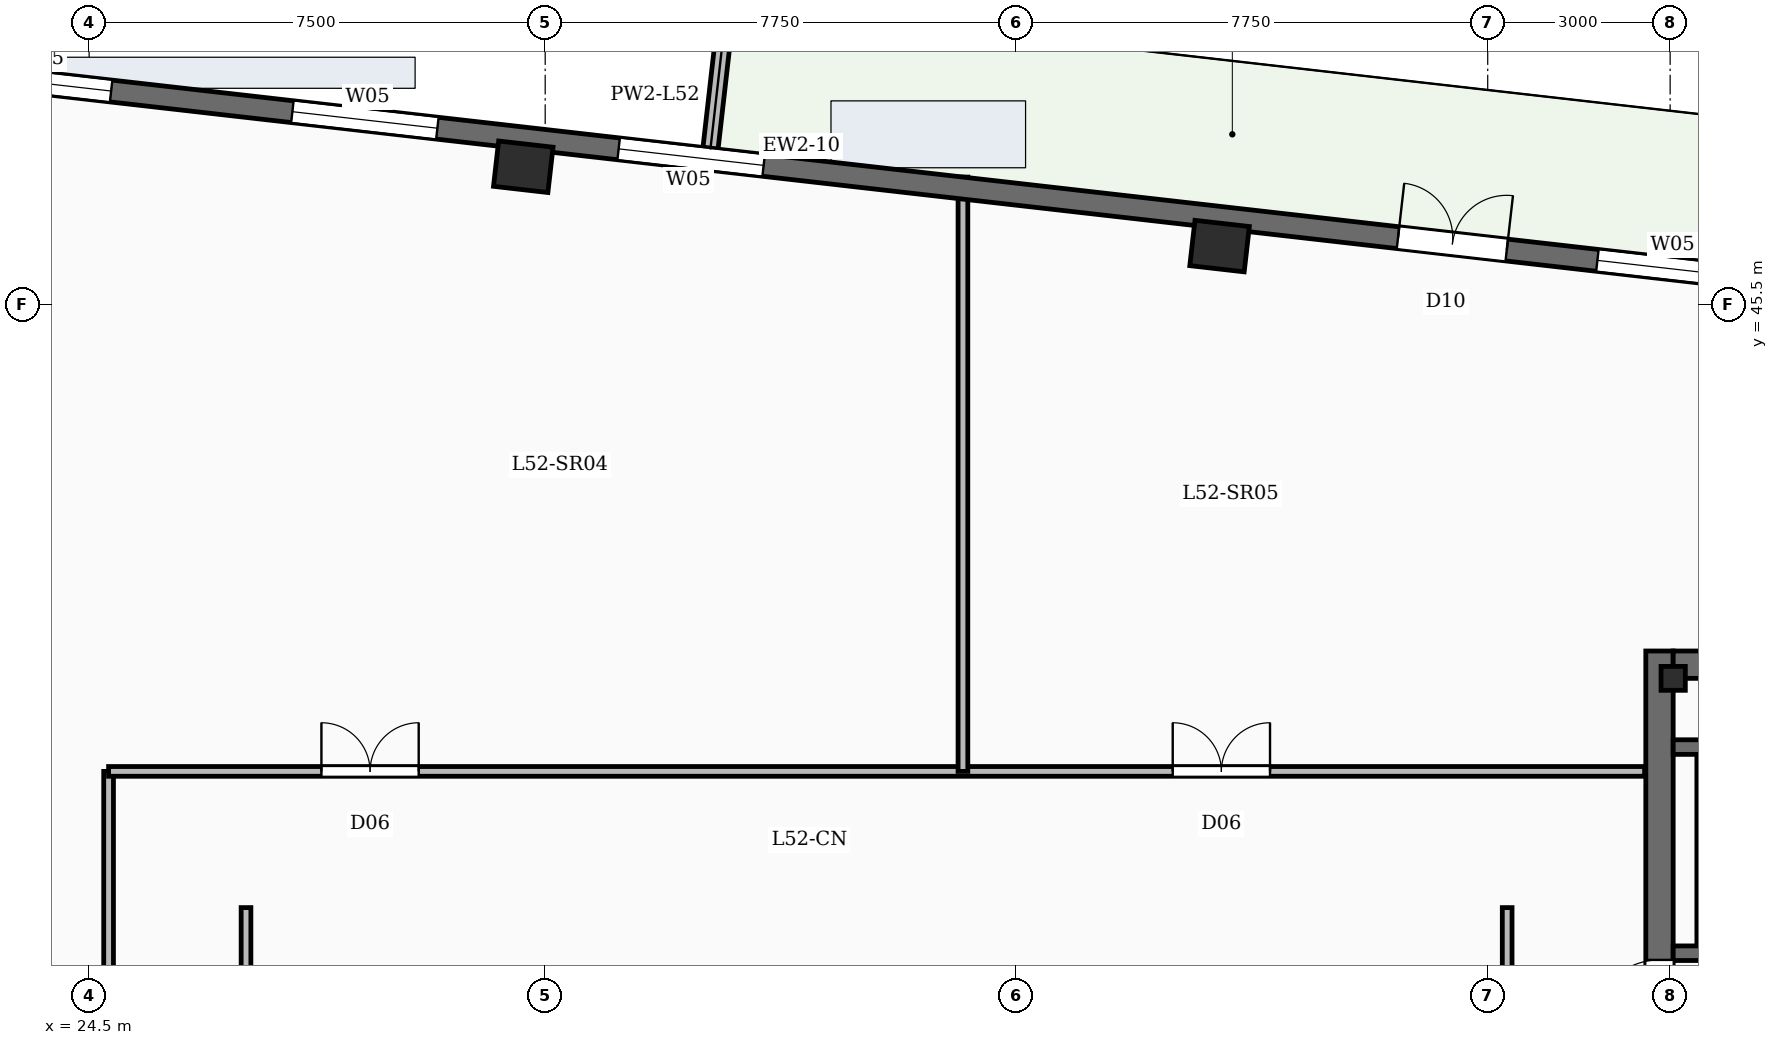
"""IFC4 building model, lengths in metres.
Left out: names, types, materials, properties, quantities, classifications, styles, units other than length and angle.
Written with IfcOpenShell. Run it as: python <this file> out.ifc"""

import sys

from ifc_helpers import new_model, si_unit, direction, frame, frame_2d, origin, origin_2d, place, context, subcontext, project, spatial, rectangle, i_section, extrude, element, fill, save


model = new_model("IFC4")
c1 = context("Model", 3, precision=1e-05, world=origin(), true_north=direction((0.0, 1.0)))
c2 = subcontext(c1, "Body", "Model", "MODEL_VIEW")
j1 = project(units=[si_unit("LENGTHUNIT", "METRE"), si_unit("PLANEANGLEUNIT", "RADIAN")], contexts=[c1])
p1 = place(None, origin())
s1 = spatial("IfcSite", under=j1, at=p1, CompositionType="ELEMENT")
p2 = place(p1, origin())
s2 = spatial("IfcBuilding", under=s1, at=p2, CompositionType="ELEMENT")
p3 = place(p2, frame((0.0, 0.0, 216.15)))
s3 = spatial("IfcBuildingStorey", under=s2, at=p3, CompositionType="ELEMENT", Elevation=216.15)
p4 = place(p3, frame((50.325, 19.0, -0.45), z_axis=(0.0, 0.0, 1.0), x_axis=(0.0, 1.0, 0.0)))
e1 = element("IfcWall", 1, at=p4, inside=s3, PredefinedType="SHEAR", context=c2, shape_type="SweptSolid", body=[
    extrude(rectangle(XDim=20.8, YDim=0.45, at=frame_2d((10.4, 0.0))), origin(), (0.0, 0.0, 1.0), 4.98),
])
p5 = place(p4, frame((2.5, 0.0, 0.45)))
e2 = element("IfcOpeningElement", 2, at=p5, cuts=e1, PredefinedType="OPENING", context=c2, shape_type="SweptSolid", body=[
    extrude(rectangle(XDim=1.05, YDim=2.15, at=frame_2d((0.525, 1.075))), frame((0.0, 0.235, 0.0), z_axis=(0.0, -1.0, 0.0), x_axis=(1.0, 0.0, 0.0)), (0.0, 0.0, 1.0), 0.47),
])
p6 = place(p4, frame((8.65, 0.0, 0.45)))
e3 = element("IfcOpeningElement", 3, at=p6, cuts=e1, PredefinedType="OPENING", context=c2, shape_type="SweptSolid", body=[
    extrude(rectangle(XDim=1.05, YDim=2.15, at=frame_2d((0.525, 1.075))), frame((0.0, 0.235, 0.0), z_axis=(0.0, -1.0, 0.0), x_axis=(1.0, 0.0, 0.0)), (0.0, 0.0, 1.0), 0.47),
])
p7 = place(p4, frame((14.62, 0.0, 0.45)))
e4 = element("IfcOpeningElement", 4, at=p7, cuts=e1, PredefinedType="OPENING", context=c2, shape_type="SweptSolid", body=[
    extrude(rectangle(XDim=1.1, YDim=2.15, at=frame_2d((0.55, 1.075))), frame((0.0, 0.235, 0.0), z_axis=(0.0, -1.0, 0.0), x_axis=(1.0, 0.0, 0.0)), (0.0, 0.0, 1.0), 0.47),
])
p8 = place(p3, frame((50.55, 39.575, -0.45), z_axis=(0.0, 0.0, 1.0), x_axis=(1.0, 0.0, 0.0)))
e5 = element("IfcWall", 5, at=p8, inside=s3, PredefinedType="SHEAR", context=c2, shape_type="SweptSolid", body=[
    extrude(rectangle(XDim=9.8, YDim=0.45, at=frame_2d((4.9, 0.0))), origin(), (0.0, 0.0, 1.0), 4.98),
])
p9 = place(p3, frame((50.55, 39.35, -0.45), z_axis=(0.0, 0.0, 1.0), x_axis=(1.0, 0.0, 0.0)))
e6 = element("IfcColumn", 6, at=p9, inside=s3, PredefinedType="COLUMN", context=c2, shape_type="SweptSolid", body=[
    extrude(i_section(OverallWidth=0.399, OverallDepth=0.393, WebThickness=0.023, FlangeThickness=0.037, FilletRadius=0.02, at=origin_2d()), origin(), (0.0, 0.0, 1.0), 4.98),
])
for number, where, z_axis, x_axis in (
    (7, (43.091, 46.458, -0.45), (0.0, 0.0, 1.0), (0.994, -0.113, 0.0)),
    (8, (31.64, 47.763, -0.45), (0.0, 0.0, 1.0), (0.994, -0.113, 0.0)),
):
    element("IfcColumn", number, at=place(p3, frame(where, z_axis=z_axis, x_axis=x_axis)), inside=s3, PredefinedType="COLUMN", context=c2, shape_type="SweptSolid", body=[
        extrude(rectangle(XDim=0.9, YDim=0.75, at=origin_2d()), origin(), (0.0, 0.0, 1.0), 4.98),
    ])
p10 = place(p3, frame((19.894, 49.575, 0.0), z_axis=(0.0, 0.0, 1.0), x_axis=(0.993571439016, -0.113206870688, 0.0)))
e9 = element("IfcWall", 9, at=p10, inside=s3, PredefinedType="SOLIDWALL", context=c2, shape_type="SweptSolid", body=[
    extrude(rectangle(XDim=46.8, YDim=0.36, at=frame_2d((23.4, 0.0))), origin(), (0.0, 0.0, 1.0), 4.53),
])
p11 = place(p10, frame((26.3, 0.0, 0.0)))
e10 = element("IfcOpeningElement", 10, at=p11, cuts=e9, PredefinedType="OPENING", context=c2, shape_type="SweptSolid", body=[
    extrude(rectangle(XDim=1.8, YDim=2.25, at=frame_2d((0.9, 1.125))), frame((0.0, 0.19, 0.0), z_axis=(0.0, -1.0, 0.0), x_axis=(1.0, 0.0, 0.0)), (0.0, 0.0, 1.0), 0.38),
])
p12 = place(p10, frame((2.6, 0.0, 0.85)))
e11 = element("IfcOpeningElement", 11, at=p12, cuts=e9, PredefinedType="OPENING", context=c2, shape_type="SweptSolid", body=[
    extrude(rectangle(XDim=2.4, YDim=3.0, at=frame_2d((1.2, 1.5))), frame((0.0, 0.19, 0.0), z_axis=(0.0, -1.0, 0.0), x_axis=(1.0, 0.0, 0.0)), (0.0, 0.0, 1.0), 0.38),
])
p13 = place(p10, frame((8.0, 0.0, 0.85)))
e12 = element("IfcOpeningElement", 12, at=p13, cuts=e9, PredefinedType="OPENING", context=c2, shape_type="SweptSolid", body=[
    extrude(rectangle(XDim=2.4, YDim=3.0, at=frame_2d((1.2, 1.5))), frame((0.0, 0.19, 0.0), z_axis=(0.0, -1.0, 0.0), x_axis=(1.0, 0.0, 0.0)), (0.0, 0.0, 1.0), 0.38),
])
p14 = place(p10, frame((13.4, 0.0, 0.85)))
e13 = element("IfcOpeningElement", 13, at=p14, cuts=e9, PredefinedType="OPENING", context=c2, shape_type="SweptSolid", body=[
    extrude(rectangle(XDim=2.4, YDim=3.0, at=frame_2d((1.2, 1.5))), frame((0.0, 0.19, 0.0), z_axis=(0.0, -1.0, 0.0), x_axis=(1.0, 0.0, 0.0)), (0.0, 0.0, 1.0), 0.38),
])
p15 = place(p10, frame((29.6, 0.0, 0.85)))
e14 = element("IfcOpeningElement", 14, at=p15, cuts=e9, PredefinedType="OPENING", context=c2, shape_type="SweptSolid", body=[
    extrude(rectangle(XDim=2.4, YDim=3.0, at=frame_2d((1.2, 1.5))), frame((0.0, 0.19, 0.0), z_axis=(0.0, -1.0, 0.0), x_axis=(1.0, 0.0, 0.0)), (0.0, 0.0, 1.0), 0.38),
])
p16 = place(p3, frame((34.719, 48.067, 0.0), z_axis=(0.0, 0.0, 1.0), x_axis=(0.113222385986, 0.993569671091, 0.0)))
e15 = element("IfcWall", 15, at=p16, inside=s3, PredefinedType="PARAPET", context=c2, shape_type="SweptSolid", body=[
    extrude(rectangle(XDim=2.4, YDim=0.25, at=frame_2d((1.2, 0.0))), origin(), (0.0, 0.0, 1.0), 1.12),
])
p17 = place(p3, frame((60.35, 34.83, 0.0), z_axis=(0.0, 0.0, 1.0), x_axis=(-1.0, 0.0, 0.0)))
e16 = element("IfcWall", 16, at=p17, inside=s3, PredefinedType="SOLIDWALL", context=c2, shape_type="SweptSolid", body=[
    extrude(rectangle(XDim=9.8, YDim=0.24, at=frame_2d((4.9, 0.0))), origin(), (0.0, 0.0, 1.0), 4.53),
])
p18 = place(p17, frame((7.87, 0.0, 0.0)))
e17 = element("IfcOpeningElement", 17, at=p18, cuts=e16, PredefinedType="OPENING", context=c2, shape_type="SweptSolid", body=[
    extrude(rectangle(XDim=1.1, YDim=2.15, at=frame_2d((0.55, 1.075))), frame((0.0, 0.13, 0.0), z_axis=(0.0, -1.0, 0.0), x_axis=(1.0, 0.0, 0.0)), (0.0, 0.0, 1.0), 0.26),
])
p19 = place(p3, frame((50.55, 38.22, 0.0), z_axis=(0.0, 0.0, 1.0), x_axis=(1.0, 0.0, 0.0)))
e18 = element("IfcWall", 18, at=p19, inside=s3, PredefinedType="SOLIDWALL", context=c2, shape_type="SweptSolid", body=[
    extrude(rectangle(XDim=9.8, YDim=0.24, at=frame_2d((4.9, 0.0))), origin(), (0.0, 0.0, 1.0), 4.53),
])
p20 = place(p3, frame((51.06, 34.95, 0.0), z_axis=(0.0, 0.0, 1.0), x_axis=(0.0, 1.0, 0.0)))
e19 = element("IfcWall", 19, at=p20, inside=s3, PredefinedType="SOLIDWALL", context=c2, shape_type="SweptSolid", body=[
    extrude(rectangle(XDim=3.15, YDim=0.24, at=frame_2d((1.575, 0.0))), origin(), (0.0, 0.0, 1.0), 4.53),
])
for number, where, z_axis, x_axis in (
    (20, (27.08, 15.38, 0.0), (0.0, 0.0, 1.0), (0.0, 1.0, 0.0)),
    (21, (47.82, 15.38, 0.0), (0.0, 0.0, 1.0), (0.0, 1.0, 0.0)),
):
    element("IfcWall", number, at=place(p3, frame(where, z_axis=z_axis, x_axis=x_axis)), inside=s3, PredefinedType="PARTITIONING", context=c2, shape_type="SweptSolid", body=[
        extrude(rectangle(XDim=20.2, YDim=0.16, at=frame_2d((10.1, 0.0))), origin(), (0.0, 0.0, 1.0), 3.59),
    ])
p21 = place(p3, frame((24.82, 34.25, 0.0), z_axis=(0.0, 0.0, 1.0), x_axis=(0.0, 1.0, 0.0)))
e22 = element("IfcWall", 22, at=p21, inside=s3, PredefinedType="PARTITIONING", context=c2, shape_type="SweptSolid", body=[
    extrude(rectangle(XDim=3.57, YDim=0.16, at=frame_2d((1.785, 0.0))), origin(), (0.0, 0.0, 1.0), 3.59),
])
p22 = place(p3, frame((24.82, 37.82, 0.0), z_axis=(0.0, 0.0, 1.0), x_axis=(1.0, 0.0, 0.0)))
e23 = element("IfcWall", 23, at=p22, inside=s3, PredefinedType="PARTITIONING", context=c2, shape_type="SweptSolid", body=[
    extrude(rectangle(XDim=25.26, YDim=0.16, at=frame_2d((12.63, 0.0))), origin(), (0.0, 0.0, 1.0), 3.59),
])
p23 = place(p22, frame((3.5, 0.0, 0.0)))
e24 = element("IfcOpeningElement", 24, at=p23, cuts=e23, PredefinedType="OPENING", context=c2, shape_type="SweptSolid", body=[
    extrude(rectangle(XDim=1.6, YDim=2.15, at=frame_2d((0.8, 1.075))), frame((0.0, 0.09, 0.0), z_axis=(0.0, -1.0, 0.0), x_axis=(1.0, 0.0, 0.0)), (0.0, 0.0, 1.0), 0.18),
])
p24 = place(p22, frame((17.5, 0.0, 0.0)))
e25 = element("IfcOpeningElement", 25, at=p24, cuts=e23, PredefinedType="OPENING", context=c2, shape_type="SweptSolid", body=[
    extrude(rectangle(XDim=1.6, YDim=2.15, at=frame_2d((0.8, 1.075))), frame((0.0, 0.09, 0.0), z_axis=(0.0, -1.0, 0.0), x_axis=(1.0, 0.0, 0.0)), (0.0, 0.0, 1.0), 0.18),
])
p25 = place(p3, frame((38.87, 37.82, 0.0), z_axis=(0.0, 0.0, 1.0), x_axis=(0.0, 1.0, 0.0)))
e26 = element("IfcWall", 26, at=p25, inside=s3, PredefinedType="PARTITIONING", context=c2, shape_type="SweptSolid", body=[
    extrude(rectangle(XDim=9.774, YDim=0.16, at=frame_2d((4.887, 0.0))), origin(), (0.0, 0.0, 1.0), 3.59),
])
p26 = place(p11, origin())
e27 = element("IfcDoor", 27, at=p26, inside=s3, OperationType="DOUBLE_DOOR_SINGLE_SWING", PredefinedType="DOOR", context=c2, shape_type="SweptSolid", body=[
    extrude(rectangle(XDim=1.8, YDim=2.25, at=frame_2d((0.9, 1.125))), frame((0.0, 0.025, 0.0), z_axis=(0.0, -1.0, 0.0), x_axis=(1.0, 0.0, 0.0)), (0.0, 0.0, 1.0), 0.05),
])
fill(e10, e27)
p27 = place(p12, origin())
e28 = element("IfcWindow", 28, at=p27, inside=s3, PartitioningType="DOUBLE_PANEL_VERTICAL", PredefinedType="WINDOW", context=c2, shape_type="SweptSolid", body=[
    extrude(rectangle(XDim=2.4, YDim=3.0, at=frame_2d((1.2, 1.5))), frame((0.0, 0.03, 0.0), z_axis=(0.0, -1.0, 0.0), x_axis=(1.0, 0.0, 0.0)), (0.0, 0.0, 1.0), 0.06),
])
fill(e11, e28)
p28 = place(p13, origin())
e29 = element("IfcWindow", 29, at=p28, inside=s3, PartitioningType="DOUBLE_PANEL_VERTICAL", PredefinedType="WINDOW", context=c2, shape_type="SweptSolid", body=[
    extrude(rectangle(XDim=2.4, YDim=3.0, at=frame_2d((1.2, 1.5))), frame((0.0, 0.03, 0.0), z_axis=(0.0, -1.0, 0.0), x_axis=(1.0, 0.0, 0.0)), (0.0, 0.0, 1.0), 0.06),
])
fill(e12, e29)
p29 = place(p14, origin())
e30 = element("IfcWindow", 30, at=p29, inside=s3, PartitioningType="DOUBLE_PANEL_VERTICAL", PredefinedType="WINDOW", context=c2, shape_type="SweptSolid", body=[
    extrude(rectangle(XDim=2.4, YDim=3.0, at=frame_2d((1.2, 1.5))), frame((0.0, 0.03, 0.0), z_axis=(0.0, -1.0, 0.0), x_axis=(1.0, 0.0, 0.0)), (0.0, 0.0, 1.0), 0.06),
])
fill(e13, e30)
p30 = place(p15, origin())
e31 = element("IfcWindow", 31, at=p30, inside=s3, PartitioningType="DOUBLE_PANEL_VERTICAL", PredefinedType="WINDOW", context=c2, shape_type="SweptSolid", body=[
    extrude(rectangle(XDim=2.4, YDim=3.0, at=frame_2d((1.2, 1.5))), frame((0.0, 0.03, 0.0), z_axis=(0.0, -1.0, 0.0), x_axis=(1.0, 0.0, 0.0)), (0.0, 0.0, 1.0), 0.06),
])
fill(e14, e31)
p31 = place(p7, origin())
e32 = element("IfcDoor", 32, at=p31, inside=s3, OperationType="SINGLE_SWING_LEFT", PredefinedType="DOOR", context=c2, shape_type="SweptSolid", body=[
    extrude(rectangle(XDim=1.1, YDim=2.15, at=frame_2d((0.55, 1.075))), frame((0.0, 0.025, 0.0), z_axis=(0.0, -1.0, 0.0), x_axis=(1.0, 0.0, 0.0)), (0.0, 0.0, 1.0), 0.05),
])
fill(e4, e32)
p32 = place(p23, origin())
e33 = element("IfcDoor", 33, at=p32, inside=s3, OperationType="DOUBLE_DOOR_SINGLE_SWING", PredefinedType="DOOR", context=c2, shape_type="SweptSolid", body=[
    extrude(rectangle(XDim=1.6, YDim=2.15, at=frame_2d((0.8, 1.075))), frame((0.0, 0.025, 0.0), z_axis=(0.0, -1.0, 0.0), x_axis=(1.0, 0.0, 0.0)), (0.0, 0.0, 1.0), 0.05),
])
fill(e24, e33)
p33 = place(p24, origin())
e34 = element("IfcDoor", 34, at=p33, inside=s3, OperationType="DOUBLE_DOOR_SINGLE_SWING", PredefinedType="DOOR", context=c2, shape_type="SweptSolid", body=[
    extrude(rectangle(XDim=1.6, YDim=2.15, at=frame_2d((0.8, 1.075))), frame((0.0, 0.025, 0.0), z_axis=(0.0, -1.0, 0.0), x_axis=(1.0, 0.0, 0.0)), (0.0, 0.0, 1.0), 0.05),
])
fill(e25, e34)
save(model, sys.argv[1])
